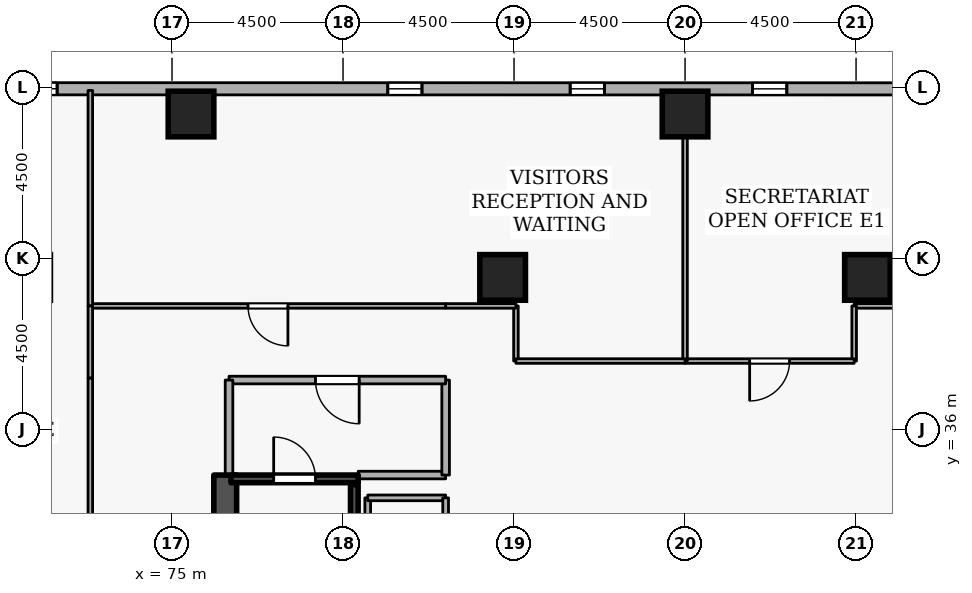
"""IFC4 building model, lengths in metres.
Left out: names, types, materials, properties, quantities, classifications, styles, units other than length and angle.
Written with IfcOpenShell. Run it as: python <this file> out.ifc"""

import sys

from ifc_helpers import new_model, si_unit, direction, frame, frame_2d, origin, origin_2d, place, context, subcontext, project, spatial, rectangle, extrude, element, fill, save


model = new_model("IFC4")
c1 = context("Model", 3, precision=1e-05, world=origin(), true_north=direction((0.0, 1.0)))
c2 = subcontext(c1, "Body", "Model", "MODEL_VIEW")
j1 = project(units=[si_unit("LENGTHUNIT", "METRE"), si_unit("PLANEANGLEUNIT", "RADIAN")], contexts=[c1])
p1 = place(None, origin())
s1 = spatial("IfcSite", under=j1, at=p1, CompositionType="ELEMENT")
p2 = place(p1, origin())
s2 = spatial("IfcBuilding", under=s1, at=p2, CompositionType="ELEMENT")
p3 = place(p2, frame((0.0, 0.0, 101.7)))
s3 = spatial("IfcBuildingStorey", under=s2, at=p3, CompositionType="ELEMENT", Elevation=101.7)
p4 = place(p3, frame((76.4, 19.2, 0.0), z_axis=(0.0, 0.0, 1.0), x_axis=(0.0, 1.0, 0.0)))
e1 = element("IfcWall", 1, at=p4, inside=s3, PredefinedType="SHEAR", context=c2, shape_type="SweptSolid", body=[
    extrude(rectangle(XDim=15.6, YDim=0.6, at=frame_2d((7.8, 0.0))), origin(), (0.0, 0.0, 1.0), 3.6),
])
for number, where, z_axis, x_axis in (
    (2, (88.5, 44.3, 0.0), (0.0, 0.0, 1.0), (1.0, 0.0, 0.0)),
    (3, (75.5, 44.3, 0.0), (0.0, 0.0, 1.0), (1.0, 0.0, 0.0)),
    (4, (93.3, 40.0, 0.0), (0.0, 0.0, 1.0), (1.0, 0.0, 0.0)),
    (5, (83.7, 40.0, 0.0), (0.0, 0.0, 1.0), (1.0, 0.0, 0.0)),
):
    element("IfcColumn", number, at=place(p3, frame(where, z_axis=z_axis, x_axis=x_axis)), inside=s3, PredefinedType="COLUMN", context=c2, shape_type="SweptSolid", body=[
        extrude(rectangle(XDim=1.2, YDim=1.2, at=origin_2d()), origin(), (0.0, 0.0, 1.0), 3.6),
    ])
p5 = place(p3, frame((102.577, 44.96, 0.0), z_axis=(0.0, 0.0, 1.0), x_axis=(-0.99999999315, 0.00011704845, 0.0)))
e6 = element("IfcWall", 6, at=p5, inside=s3, PredefinedType="STANDARD", context=c2, shape_type="SweptSolid", body=[
    extrude(rectangle(XDim=35.459, YDim=0.32, at=frame_2d((17.729, 0.0))), origin(), (0.0, 0.0, 1.0), 2.7),
])
p6 = place(p5, frame((6.6, 0.0, 0.72)))
e7 = element("IfcOpeningElement", 7, at=p6, cuts=e6, PredefinedType="OPENING", context=c2, shape_type="SweptSolid", body=[
    extrude(rectangle(XDim=0.9, YDim=1.75, at=frame_2d((0.45, 0.875))), frame((0.0, 0.17, 0.0), z_axis=(0.0, -1.0, 0.0), x_axis=(1.0, 0.0, 0.0)), (0.0, 0.0, 1.0), 0.34),
])
p7 = place(p5, frame((11.4, 0.0, 0.72)))
e8 = element("IfcOpeningElement", 8, at=p7, cuts=e6, PredefinedType="OPENING", context=c2, shape_type="SweptSolid", body=[
    extrude(rectangle(XDim=0.9, YDim=1.75, at=frame_2d((0.45, 0.875))), frame((0.0, 0.17, 0.0), z_axis=(0.0, -1.0, 0.0), x_axis=(1.0, 0.0, 0.0)), (0.0, 0.0, 1.0), 0.34),
])
p8 = place(p5, frame((16.2, 0.0, 0.72)))
e9 = element("IfcOpeningElement", 9, at=p8, cuts=e6, PredefinedType="OPENING", context=c2, shape_type="SweptSolid", body=[
    extrude(rectangle(XDim=0.9, YDim=1.75, at=frame_2d((0.45, 0.875))), frame((0.0, 0.17, 0.0), z_axis=(0.0, -1.0, 0.0), x_axis=(1.0, 0.0, 0.0)), (0.0, 0.0, 1.0), 0.34),
])
p9 = place(p5, frame((21.0, 0.0, 0.72)))
e10 = element("IfcOpeningElement", 10, at=p9, cuts=e6, PredefinedType="OPENING", context=c2, shape_type="SweptSolid", body=[
    extrude(rectangle(XDim=0.9, YDim=1.75, at=frame_2d((0.45, 0.875))), frame((0.0, 0.17, 0.0), z_axis=(0.0, -1.0, 0.0), x_axis=(1.0, 0.0, 0.0)), (0.0, 0.0, 1.0), 0.34),
])
p10 = place(p5, frame((30.6, 0.0, 0.72)))
e11 = element("IfcOpeningElement", 11, at=p10, cuts=e6, PredefinedType="OPENING", context=c2, shape_type="SweptSolid", body=[
    extrude(rectangle(XDim=0.9, YDim=1.75, at=frame_2d((0.45, 0.875))), frame((0.0, 0.17, 0.0), z_axis=(0.0, -1.0, 0.0), x_axis=(1.0, 0.0, 0.0)), (0.0, 0.0, 1.0), 0.34),
])
p11 = place(p3, frame((76.55, 34.7, 0.0), z_axis=(0.0, 0.0, 1.0), x_axis=(1.0, 0.0, 0.0)))
e12 = element("IfcWall", 12, at=p11, inside=s3, PredefinedType="SHEAR", context=c2, shape_type="SweptSolid", body=[
    extrude(rectangle(XDim=3.35, YDim=0.2, at=frame_2d((1.675, 0.0))), origin(), (0.0, 0.0, 1.0), 3.6),
])
p12 = place(p11, frame((1.125, 0.0, 0.0)))
e13 = element("IfcOpeningElement", 13, at=p12, cuts=e12, PredefinedType="OPENING", context=c2, shape_type="SweptSolid", body=[
    extrude(rectangle(XDim=1.1, YDim=2.1, at=frame_2d((0.55, 1.05))), frame((0.0, 0.11, 0.0), z_axis=(0.0, -1.0, 0.0), x_axis=(1.0, 0.0, 0.0)), (0.0, 0.0, 1.0), 0.22),
])
p13 = place(p3, frame((79.797, 27.45, 0.0), z_axis=(0.0, 0.0, 1.0), x_axis=(0.0, 1.0, 0.0)))
e14 = element("IfcWall", 14, at=p13, inside=s3, PredefinedType="SHEAR", context=c2, shape_type="SweptSolid", body=[
    extrude(rectangle(XDim=7.1, YDim=0.2, at=frame_2d((3.55, 0.0))), origin(), (0.0, 0.0, 1.0), 3.6),
])
p14 = place(p3, frame((79.9, 34.8, 0.0), z_axis=(0.0, 0.0, 1.0), x_axis=(1.0, 0.0, 0.0)))
e15 = element("IfcWall", 15, at=p14, inside=s3, PredefinedType="STANDARD", context=c2, shape_type="SweptSolid", body=[
    extrude(rectangle(XDim=2.3, YDim=0.2, at=frame_2d((1.15, 0.0))), origin(), (0.0, 0.0, 1.0), 2.545),
])
p15 = place(p3, frame((82.2, 34.8, 0.0), z_axis=(0.0, 0.0, 1.0), x_axis=(0.0, 1.0, 0.0)))
e16 = element("IfcWall", 16, at=p15, inside=s3, PredefinedType="STANDARD", context=c2, shape_type="SweptSolid", body=[
    extrude(rectangle(XDim=2.5, YDim=0.2, at=frame_2d((1.25, 0.0))), origin(), (0.0, 0.0, 1.0), 3.34),
])
p16 = place(p3, frame((82.2, 37.3, 0.0), z_axis=(0.0, 0.0, 1.0), x_axis=(-1.0, 0.0, 0.0)))
e17 = element("IfcWall", 17, at=p16, inside=s3, PredefinedType="STANDARD", context=c2, shape_type="SweptSolid", body=[
    extrude(rectangle(XDim=5.7, YDim=0.2, at=frame_2d((2.85, 0.0))), origin(), (0.0, 0.0, 1.0), 3.34),
])
p17 = place(p16, frame((2.275, 0.0, 0.0)))
e18 = element("IfcOpeningElement", 18, at=p17, cuts=e17, PredefinedType="OPENING", context=c2, shape_type="SweptSolid", body=[
    extrude(rectangle(XDim=1.15, YDim=2.1, at=frame_2d((0.575, 1.05))), frame((0.0, 0.11, 0.0), z_axis=(0.0, -1.0, 0.0), x_axis=(1.0, 0.0, 0.0)), (0.0, 0.0, 1.0), 0.22),
])
p18 = place(p3, frame((76.5, 37.3, 0.0), z_axis=(0.0, 0.0, 1.0), x_axis=(0.0, -1.0, 0.0)))
e19 = element("IfcWall", 19, at=p18, inside=s3, PredefinedType="STANDARD", context=c2, shape_type="SweptSolid", body=[
    extrude(rectangle(XDim=2.5, YDim=0.2, at=frame_2d((1.25, 0.0))), origin(), (0.0, 0.0, 1.0), 3.34),
])
p19 = place(p3, frame((80.15, 31.85, 0.0), z_axis=(0.0, 0.0, 1.0), x_axis=(0.0, 1.0, 0.0)))
e20 = element("IfcWall", 20, at=p19, inside=s3, PredefinedType="PARTITIONING", context=c2, shape_type="SweptSolid", body=[
    extrude(rectangle(XDim=2.35, YDim=0.15, at=frame_2d((1.175, 0.0))), origin(), (0.0, 0.0, 1.0), 3.34),
])
p20 = place(p3, frame((80.15, 34.2, 0.0), z_axis=(0.0, 0.0, 1.0), x_axis=(1.0, 0.0, 0.0)))
e21 = element("IfcWall", 21, at=p20, inside=s3, PredefinedType="PARTITIONING", context=c2, shape_type="SweptSolid", body=[
    extrude(rectangle(XDim=2.05, YDim=0.15, at=frame_2d((1.025, 0.0))), origin(), (0.0, 0.0, 1.0), 2.545),
])
p21 = place(p3, frame((82.2, 34.2, 0.0), z_axis=(0.0, 0.0, 1.0), x_axis=(0.0, -1.0, 0.0)))
e22 = element("IfcWall", 22, at=p21, inside=s3, PredefinedType="PARTITIONING", context=c2, shape_type="SweptSolid", body=[
    extrude(rectangle(XDim=2.35, YDim=0.15, at=frame_2d((1.175, 0.0))), origin(), (0.0, 0.0, 1.0), 3.34),
])
p22 = place(p21, frame((0.715, 0.0, 0.0)))
e23 = element("IfcOpeningElement", 23, at=p22, cuts=e22, PredefinedType="OPENING", context=c2, shape_type="SweptSolid", body=[
    extrude(rectangle(XDim=0.92, YDim=2.08, at=frame_2d((0.46, 1.04))), frame((0.0, 0.085, 0.0), z_axis=(0.0, -1.0, 0.0), x_axis=(1.0, 0.0, 0.0)), (0.0, 0.0, 1.0), 0.17),
])
p23 = place(p3, frame((94.8, 39.25, 0.0), z_axis=(0.0, 0.0, 1.0), x_axis=(-1.0, 0.0, 0.0)))
e24 = element("IfcWall", 24, at=p23, inside=s3, PredefinedType="PARTITIONING", context=c2, shape_type="SweptSolid", body=[
    extrude(rectangle(XDim=1.85, YDim=0.12, at=frame_2d((0.925, 0.0))), origin(), (0.0, 0.0, 1.0), 3.34),
])
p24 = place(p3, frame((92.95, 39.25, 0.0), z_axis=(0.0, 0.0, 1.0), x_axis=(0.0, -1.0, 0.0)))
e25 = element("IfcWall", 25, at=p24, inside=s3, PredefinedType="PARTITIONING", context=c2, shape_type="SweptSolid", body=[
    extrude(rectangle(XDim=1.45, YDim=0.12, at=frame_2d((0.725, 0.0))), origin(), (0.0, 0.0, 1.0), 3.34),
])
p25 = place(p3, frame((92.95, 37.8, 0.0), z_axis=(0.0, 0.0, 1.0), x_axis=(-1.0, 0.0, 0.0)))
e26 = element("IfcWall", 26, at=p25, inside=s3, PredefinedType="PARTITIONING", context=c2, shape_type="SweptSolid", body=[
    extrude(rectangle(XDim=4.45, YDim=0.12, at=frame_2d((2.225, 0.0))), origin(), (0.0, 0.0, 1.0), 3.34),
])
p26 = place(p25, frame((1.7, 0.0, 0.0)))
e27 = element("IfcOpeningElement", 27, at=p26, cuts=e26, PredefinedType="OPENING", context=c2, shape_type="SweptSolid", body=[
    extrude(rectangle(XDim=1.05, YDim=2.1, at=frame_2d((0.525, 1.05))), frame((0.0, 0.07, 0.0), z_axis=(0.0, -1.0, 0.0), x_axis=(1.0, 0.0, 0.0)), (0.0, 0.0, 1.0), 0.14),
])
p27 = place(p3, frame((88.5, 37.8, 0.0), z_axis=(0.0, 0.0, 1.0), x_axis=(0.0, 1.0, 0.0)))
e28 = element("IfcWall", 28, at=p27, inside=s3, PredefinedType="PARTITIONING", context=c2, shape_type="SweptSolid", body=[
    extrude(rectangle(XDim=7.12, YDim=0.12, at=frame_2d((3.56, 0.0))), origin(), (0.0, 0.0, 1.0), 2.878),
])
p28 = place(p3, frame((84.05, 37.8, 0.0), z_axis=(0.0, 0.0, 1.0), x_axis=(0.0, 1.0, 0.0)))
e29 = element("IfcWall", 29, at=p28, inside=s3, PredefinedType="PARTITIONING", context=c2, shape_type="SweptSolid", body=[
    extrude(rectangle(XDim=1.45, YDim=0.12, at=frame_2d((0.725, 0.0))), origin(), (0.0, 0.0, 1.0), 3.34),
])
p29 = place(p3, frame((84.05, 39.25, 0.0), z_axis=(0.0, 0.0, 1.0), x_axis=(-1.0, 0.0, 0.0)))
e30 = element("IfcWall", 30, at=p29, inside=s3, PredefinedType="PARTITIONING", context=c2, shape_type="SweptSolid", body=[
    extrude(rectangle(XDim=1.85, YDim=0.12, at=frame_2d((0.925, 0.0))), origin(), (0.0, 0.0, 1.0), 3.34),
])
p30 = place(p3, frame((82.2, 39.25, 0.0), z_axis=(0.0, 0.0, 1.0), x_axis=(-1.0, 0.0, 0.0)))
e31 = element("IfcWall", 31, at=p30, inside=s3, PredefinedType="PARTITIONING", context=c2, shape_type="SweptSolid", body=[
    extrude(rectangle(XDim=9.35, YDim=0.12, at=frame_2d((4.675, 0.0))), origin(), (0.0, 0.0, 1.0), 3.34),
])
p31 = place(p30, frame((4.15, 0.0, 0.0)))
e32 = element("IfcOpeningElement", 32, at=p31, cuts=e31, PredefinedType="OPENING", context=c2, shape_type="SweptSolid", body=[
    extrude(rectangle(XDim=1.05, YDim=2.1, at=frame_2d((0.525, 1.05))), frame((0.0, 0.07, 0.0), z_axis=(0.0, -1.0, 0.0), x_axis=(1.0, 0.0, 0.0)), (0.0, 0.0, 1.0), 0.14),
])
p32 = place(p3, frame((72.85, 39.25, 0.0), z_axis=(0.0, 0.0, 1.0), x_axis=(0.0, 1.0, 0.0)))
e33 = element("IfcWall", 33, at=p32, inside=s3, PredefinedType="PARTITIONING", context=c2, shape_type="SweptSolid", body=[
    extrude(rectangle(XDim=5.67, YDim=0.12, at=frame_2d((2.835, 0.0))), origin(), (0.0, 0.0, 1.0), 3.34),
])
p33 = place(p3, frame((88.5, 37.8, 0.0), z_axis=(0.0, 0.0, 1.0), x_axis=(-1.0, 0.0, 0.0)))
e34 = element("IfcWall", 34, at=p33, inside=s3, PredefinedType="PARTITIONING", context=c2, shape_type="SweptSolid", body=[
    extrude(rectangle(XDim=4.45, YDim=0.12, at=frame_2d((2.225, 0.0))), origin(), (0.0, 0.0, 1.0), 3.34),
])
p34 = place(p3, frame((72.85, 39.25, 0.0), z_axis=(0.0, 0.0, 1.0), x_axis=(0.0, -1.0, 0.0)))
e35 = element("IfcWall", 35, at=p34, inside=s3, PredefinedType="PARTITIONING", context=c2, shape_type="SweptSolid", body=[
    extrude(rectangle(XDim=1.9, YDim=0.12, at=frame_2d((0.95, 0.0))), origin(), (0.0, 0.0, 1.0), 3.34),
])
p35 = place(p3, frame((72.85, 37.35, 0.0), z_axis=(0.0, 0.0, 1.0), x_axis=(0.0, -1.0, 0.0)))
e36 = element("IfcWall", 36, at=p35, inside=s3, PredefinedType="PARTITIONING", context=c2, shape_type="SweptSolid", body=[
    extrude(rectangle(XDim=10.35, YDim=0.12, at=frame_2d((5.175, 0.0))), origin(), (0.0, 0.0, 1.0), 2.895),
])
p36 = place(p35, frame((4.65, 0.0, 0.0)))
e37 = element("IfcOpeningElement", 37, at=p36, cuts=e36, PredefinedType="OPENING", context=c2, shape_type="SweptSolid", body=[
    extrude(rectangle(XDim=1.05, YDim=2.1, at=frame_2d((0.525, 1.05))), frame((0.0, 0.07, 0.0), z_axis=(0.0, -1.0, 0.0), x_axis=(1.0, 0.0, 0.0)), (0.0, 0.0, 1.0), 0.14),
])
p37 = place(p7, origin())
e38 = element("IfcWindow", 38, at=p37, inside=s3, PartitioningType="SINGLE_PANEL", PredefinedType="WINDOW", context=c2, shape_type="SweptSolid", body=[
    extrude(rectangle(XDim=0.9, YDim=1.75, at=frame_2d((0.45, 0.875))), frame((0.0, 0.03, 0.0), z_axis=(0.0, -1.0, 0.0), x_axis=(1.0, 0.0, 0.0)), (0.0, 0.0, 1.0), 0.06),
])
fill(e8, e38)
p38 = place(p8, origin())
e39 = element("IfcWindow", 39, at=p38, inside=s3, PartitioningType="SINGLE_PANEL", PredefinedType="WINDOW", context=c2, shape_type="SweptSolid", body=[
    extrude(rectangle(XDim=0.9, YDim=1.75, at=frame_2d((0.45, 0.875))), frame((0.0, 0.03, 0.0), z_axis=(0.0, -1.0, 0.0), x_axis=(1.0, 0.0, 0.0)), (0.0, 0.0, 1.0), 0.06),
])
fill(e9, e39)
p39 = place(p9, origin())
e40 = element("IfcWindow", 40, at=p39, inside=s3, PartitioningType="SINGLE_PANEL", PredefinedType="WINDOW", context=c2, shape_type="SweptSolid", body=[
    extrude(rectangle(XDim=0.9, YDim=1.75, at=frame_2d((0.45, 0.875))), frame((0.0, 0.03, 0.0), z_axis=(0.0, -1.0, 0.0), x_axis=(1.0, 0.0, 0.0)), (0.0, 0.0, 1.0), 0.06),
])
fill(e10, e40)
p40 = place(p10, origin())
e41 = element("IfcWindow", 41, at=p40, inside=s3, PartitioningType="SINGLE_PANEL", PredefinedType="WINDOW", context=c2, shape_type="SweptSolid", body=[
    extrude(rectangle(XDim=0.9, YDim=1.75, at=frame_2d((0.45, 0.875))), frame((0.0, 0.03, 0.0), z_axis=(0.0, -1.0, 0.0), x_axis=(1.0, 0.0, 0.0)), (0.0, 0.0, 1.0), 0.06),
])
fill(e11, e41)
p41 = place(p12, origin())
e42 = element("IfcDoor", 42, at=p41, inside=s3, OperationType="SINGLE_SWING_LEFT", PredefinedType="DOOR", context=c2, shape_type="SweptSolid", body=[
    extrude(rectangle(XDim=1.1, YDim=2.1, at=frame_2d((0.55, 1.05))), frame((0.0, 0.025, 0.0), z_axis=(0.0, -1.0, 0.0), x_axis=(1.0, 0.0, 0.0)), (0.0, 0.0, 1.0), 0.05),
])
fill(e13, e42)
p42 = place(p17, origin())
e43 = element("IfcDoor", 43, at=p42, inside=s3, OperationType="SINGLE_SWING_LEFT", PredefinedType="DOOR", context=c2, shape_type="SweptSolid", body=[
    extrude(rectangle(XDim=1.15, YDim=2.1, at=frame_2d((0.575, 1.05))), frame((0.0, 0.025, 0.0), z_axis=(0.0, -1.0, 0.0), x_axis=(1.0, 0.0, 0.0)), (0.0, 0.0, 1.0), 0.05),
])
fill(e18, e43)
p43 = place(p26, origin())
e44 = element("IfcDoor", 44, at=p43, inside=s3, OperationType="SINGLE_SWING_RIGHT", PredefinedType="DOOR", context=c2, shape_type="SweptSolid", body=[
    extrude(rectangle(XDim=1.05, YDim=2.1, at=frame_2d((0.525, 1.05))), frame((0.0, 0.025, 0.0), z_axis=(0.0, -1.0, 0.0), x_axis=(1.0, 0.0, 0.0)), (0.0, 0.0, 1.0), 0.05),
])
fill(e27, e44)
p44 = place(p31, origin())
e45 = element("IfcDoor", 45, at=p44, inside=s3, OperationType="SINGLE_SWING_LEFT", PredefinedType="DOOR", context=c2, shape_type="SweptSolid", body=[
    extrude(rectangle(XDim=1.05, YDim=2.1, at=frame_2d((0.525, 1.05))), frame((0.0, 0.025, 0.0), z_axis=(0.0, -1.0, 0.0), x_axis=(1.0, 0.0, 0.0)), (0.0, 0.0, 1.0), 0.05),
])
fill(e32, e45)
save(model, sys.argv[1])
